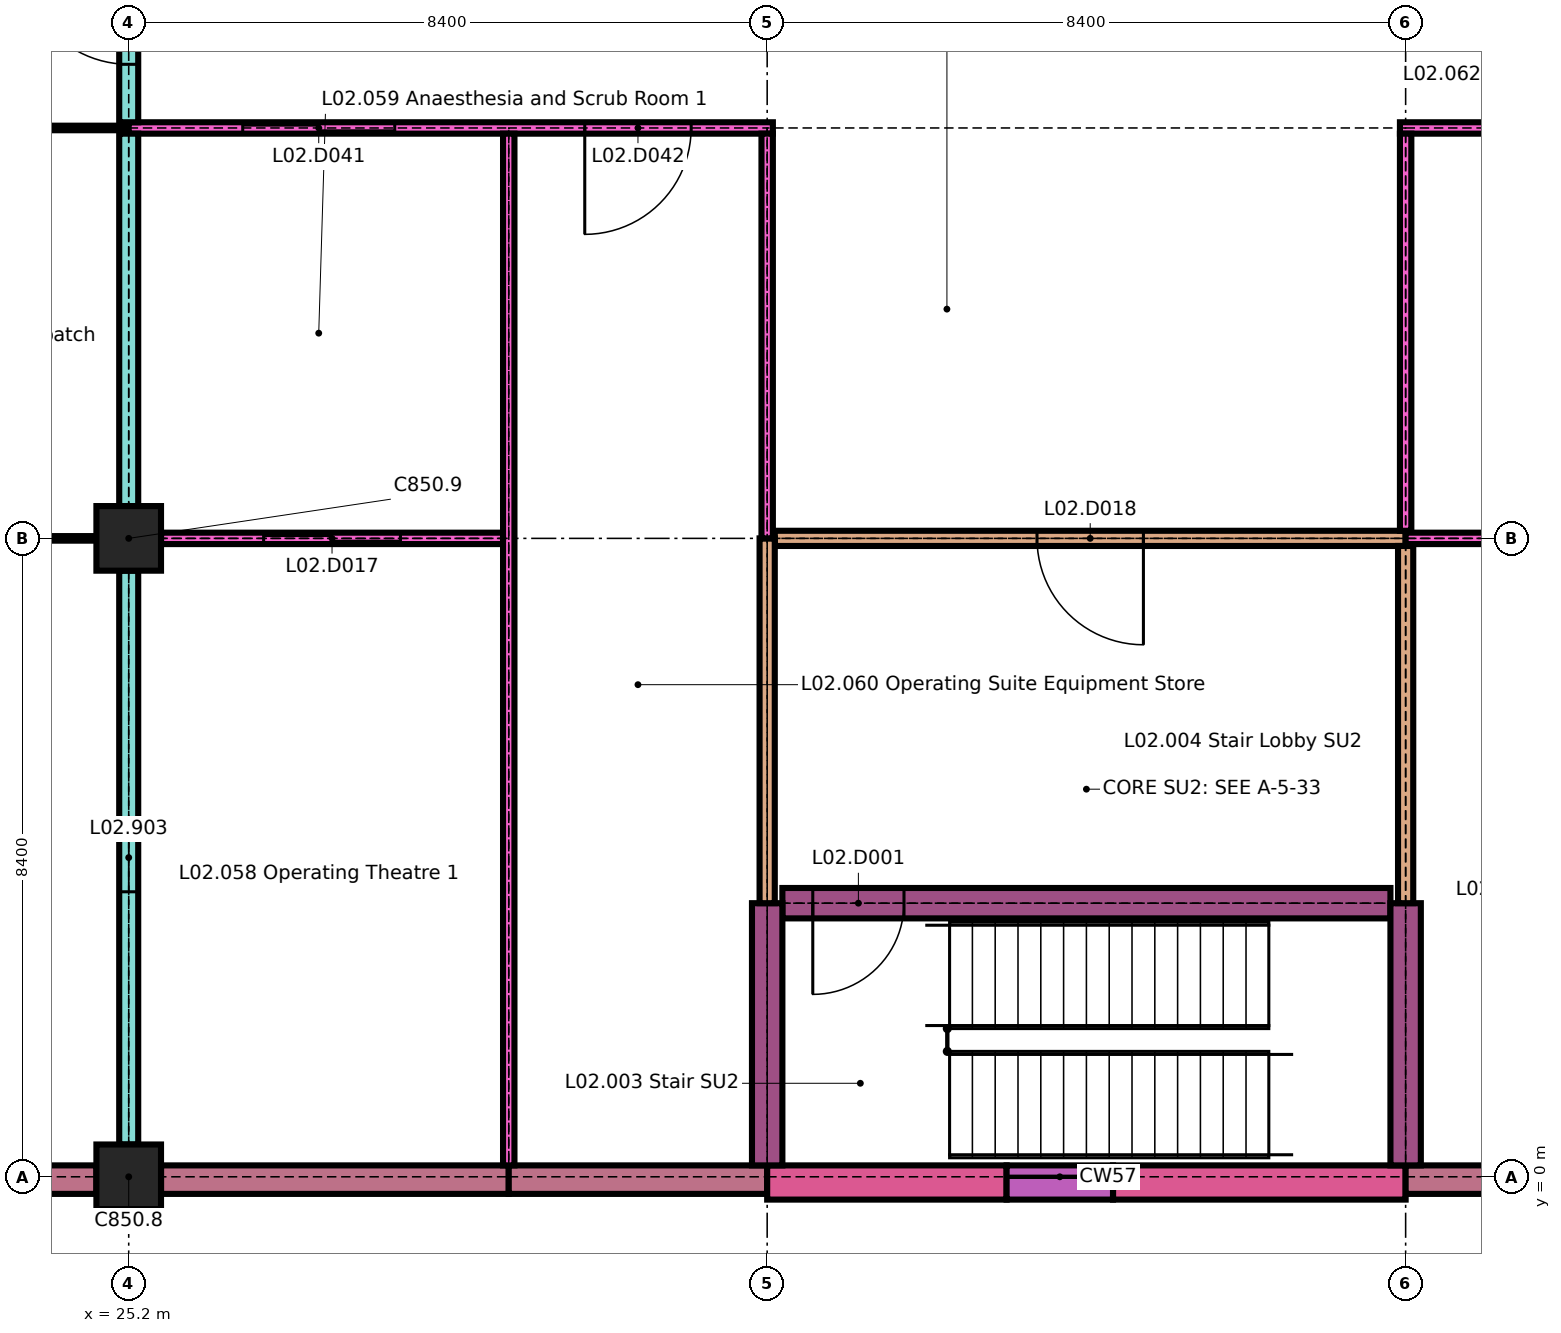
"""IFC4 building model, lengths in metres.
Left out: names, types, materials, properties, quantities, classifications, styles, units other than length and angle.
Written with IfcOpenShell. Run it as: python <this file> out.ifc"""

import sys

from ifc_helpers import new_model, si_unit, direction, frame, frame_2d, origin, origin_2d, place, context, subcontext, project, spatial, rectangle, extrude, element, fill, save


model = new_model("IFC4")
c1 = context("Model", 3, precision=1e-05, world=origin(), true_north=direction((0.0, 1.0)))
c2 = subcontext(c1, "Body", "Model", "MODEL_VIEW")
j1 = project(units=[si_unit("LENGTHUNIT", "METRE"), si_unit("PLANEANGLEUNIT", "RADIAN")], contexts=[c1])
p1 = place(None, origin())
s1 = spatial("IfcSite", under=j1, at=p1, CompositionType="ELEMENT")
p2 = place(p1, origin())
s2 = spatial("IfcBuilding", under=s1, at=p2, CompositionType="ELEMENT")
p3 = place(p2, frame((0.0, 0.0, 8.4)))
s3 = spatial("IfcBuildingStorey", under=s2, at=p3, CompositionType="ELEMENT", Elevation=8.4)
for number, where, z_axis, x_axis in (
    (1, (25.2, 0.0, 0.0), (0.0, 0.0, 1.0), (1.0, 0.0, 0.0)),
    (2, (25.2, 8.4, 0.0), (0.0, 0.0, 1.0), (1.0, 0.0, 0.0)),
):
    element("IfcColumn", number, at=place(p3, frame(where, z_axis=z_axis, x_axis=x_axis)), inside=s3, PredefinedType="COLUMN", context=c2, shape_type="SweptSolid", body=[
        extrude(rectangle(XDim=0.85, YDim=0.85, at=origin_2d()), origin(), (0.0, 0.0, 1.0), 4.2),
    ])
p4 = place(p3, frame((17.225, -0.038, 0.0), z_axis=(0.0, 0.0, 1.0), x_axis=(1.0, 0.0, 0.0)))
e3 = element("IfcWall", 3, at=p4, inside=s3, PredefinedType="SOLIDWALL", context=c2, shape_type="SweptSolid", body=[
    extrude(rectangle(XDim=7.55, YDim=0.375, at=frame_2d((3.775, 0.0))), origin(), (0.0, 0.0, 1.0), 3.9),
])
p5 = place(p3, frame((25.625, -0.038, 0.0), z_axis=(0.0, 0.0, 1.0), x_axis=(1.0, 0.0, 0.0)))
e4 = element("IfcWall", 4, at=p5, inside=s3, PredefinedType="SOLIDWALL", context=c2, shape_type="SweptSolid", body=[
    extrude(rectangle(XDim=4.575, YDim=0.375, at=frame_2d((2.288, 0.0))), origin(), (0.0, 0.0, 1.0), 3.9),
])
p6 = place(p3, frame((30.2, -0.038, 0.0), z_axis=(0.0, 0.0, 1.0), x_axis=(1.0, 0.0, 0.0)))
e5 = element("IfcWall", 5, at=p6, inside=s3, PredefinedType="SOLIDWALL", context=c2, shape_type="SweptSolid", body=[
    extrude(rectangle(XDim=3.4, YDim=0.375, at=frame_2d((1.7, 0.0))), origin(), (0.0, 0.0, 1.0), 3.9),
])
p7 = place(p3, frame((33.6, -0.075, 0.0), z_axis=(0.0, 0.0, 1.0), x_axis=(1.0, 0.0, 0.0)))
e6 = element("IfcWall", 6, at=p7, inside=s3, PredefinedType="SOLIDWALL", context=c2, shape_type="SweptSolid", body=[
    extrude(rectangle(XDim=3.15, YDim=0.45, at=frame_2d((1.575, 0.0))), origin(), (0.0, 0.0, 1.0), 4.2),
])
p8 = place(p3, frame((38.15, -0.075, 0.0), z_axis=(0.0, 0.0, 1.0), x_axis=(1.0, 0.0, 0.0)))
e7 = element("IfcWall", 7, at=p8, inside=s3, PredefinedType="SOLIDWALL", context=c2, shape_type="SweptSolid", body=[
    extrude(rectangle(XDim=3.85, YDim=0.45, at=frame_2d((1.925, 0.0))), origin(), (0.0, 0.0, 1.0), 4.2),
])
p9 = place(p3, frame((36.75, -0.075, 0.0), z_axis=(0.0, 0.0, 1.0), x_axis=(1.0, 0.0, 0.0)))
e8 = element("IfcWall", 8, at=p9, inside=s3, PredefinedType="SOLIDWALL", context=c2, shape_type="SweptSolid", body=[
    extrude(rectangle(XDim=1.4, YDim=0.45, at=frame_2d((0.7, 0.0))), origin(), (0.0, 0.0, 1.0), 0.6),
])
p10 = place(p3, frame((42.0, -0.038, 0.0), z_axis=(0.0, 0.0, 1.0), x_axis=(1.0, 0.0, 0.0)))
e9 = element("IfcWall", 9, at=p10, inside=s3, PredefinedType="SOLIDWALL", context=c2, shape_type="SweptSolid", body=[
    extrude(rectangle(XDim=5.0, YDim=0.375, at=frame_2d((2.5, 0.0))), origin(), (0.0, 0.0, 1.0), 3.9),
])
p11 = place(p10, frame((1.05, 0.0, 0.9)))
e10 = element("IfcOpeningElement", 10, at=p11, cuts=e9, PredefinedType="OPENING", context=c2, shape_type="SweptSolid", body=[
    extrude(rectangle(XDim=2.1, YDim=2.4, at=frame_2d((1.05, 1.2))), frame((0.0, 0.198, 0.0), z_axis=(0.0, -1.0, 0.0), x_axis=(1.0, 0.0, 0.0)), (0.0, 0.0, 1.0), 0.395),
])
p12 = place(p3, frame((33.8, 3.6, 0.0), z_axis=(0.0, 0.0, 1.0), x_axis=(1.0, 0.0, 0.0)))
e11 = element("IfcWall", 11, at=p12, inside=s3, PredefinedType="SHEAR", context=c2, shape_type="SweptSolid", body=[
    extrude(rectangle(XDim=8.0, YDim=0.4, at=frame_2d((4.0, 0.0))), origin(), (0.0, 0.0, 1.0), 4.2),
])
p13 = place(p12, frame((0.4, 0.0, 0.0)))
e12 = element("IfcOpeningElement", 12, at=p13, cuts=e11, PredefinedType="OPENING", context=c2, shape_type="SweptSolid", body=[
    extrude(rectangle(XDim=1.2, YDim=2.1, at=frame_2d((0.6, 1.05))), frame((0.0, 0.21, 0.0), z_axis=(0.0, -1.0, 0.0), x_axis=(1.0, 0.0, 0.0)), (0.0, 0.0, 1.0), 0.42),
])
p14 = place(p3, frame((17.225, 8.4, 0.0), z_axis=(0.0, 0.0, 1.0), x_axis=(1.0, 0.0, 0.0)))
e13 = element("IfcWall", 13, at=p14, inside=s3, PredefinedType="PARTITIONING", context=c2, shape_type="SweptSolid", body=[
    extrude(rectangle(XDim=7.55, YDim=0.06, at=frame_2d((3.775, 0.0))), origin(), (0.0, 0.0, 1.0), 4.2),
])
p15 = place(p14, frame((3.075, 0.0, 0.0)))
e14 = element("IfcOpeningElement", 14, at=p15, cuts=e13, PredefinedType="OPENING", context=c2, shape_type="SweptSolid", body=[
    extrude(rectangle(XDim=1.4, YDim=2.1, at=frame_2d((0.7, 1.05))), frame((0.0, 0.04, 0.0), z_axis=(0.0, -1.0, 0.0), x_axis=(1.0, 0.0, 0.0)), (0.0, 0.0, 1.0), 0.08),
])
p16 = place(p3, frame((25.625, 8.4, 0.0), z_axis=(0.0, 0.0, 1.0), x_axis=(1.0, 0.0, 0.0)))
e15 = element("IfcWall", 15, at=p16, inside=s3, PredefinedType="PARTITIONING", context=c2, shape_type="SweptSolid", body=[
    extrude(rectangle(XDim=4.5, YDim=0.15, at=frame_2d((2.25, 0.0))), origin(), (0.0, 0.0, 1.0), 4.2),
])
p17 = place(p16, frame((1.35, 0.0, 0.0)))
e16 = element("IfcOpeningElement", 16, at=p17, cuts=e15, PredefinedType="OPENING", context=c2, shape_type="SweptSolid", body=[
    extrude(rectangle(XDim=1.8, YDim=2.4, at=frame_2d((0.9, 1.2))), frame((0.0, 0.085, 0.0), z_axis=(0.0, -1.0, 0.0), x_axis=(1.0, 0.0, 0.0)), (0.0, 0.0, 1.0), 0.17),
])
p18 = place(p3, frame((33.7, 8.4, 0.0), z_axis=(0.0, 0.0, 1.0), x_axis=(1.0, 0.0, 0.0)))
e17 = element("IfcWall", 17, at=p18, inside=s3, PredefinedType="PARTITIONING", context=c2, shape_type="SweptSolid", body=[
    extrude(rectangle(XDim=8.3, YDim=0.2, at=frame_2d((4.15, 0.0))), origin(), (0.0, 0.0, 1.0), 4.2),
])
p19 = place(p18, frame((3.45, 0.0, 0.0)))
e18 = element("IfcOpeningElement", 18, at=p19, cuts=e17, PredefinedType="OPENING", context=c2, shape_type="SweptSolid", body=[
    extrude(rectangle(XDim=1.4, YDim=2.1, at=frame_2d((0.7, 1.05))), frame((0.0, 0.11, 0.0), z_axis=(0.0, -1.0, 0.0), x_axis=(1.0, 0.0, 0.0)), (0.0, 0.0, 1.0), 0.22),
])
p20 = place(p3, frame((42.0, 8.4, 0.0), z_axis=(0.0, 0.0, 1.0), x_axis=(1.0, 0.0, 0.0)))
e19 = element("IfcWall", 19, at=p20, inside=s3, PredefinedType="PARTITIONING", context=c2, shape_type="SweptSolid", body=[
    extrude(rectangle(XDim=7.95, YDim=0.15, at=frame_2d((3.975, 0.0))), origin(), (0.0, 0.0, 1.0), 4.2),
])
p21 = place(p20, frame((1.6, 0.0, 0.0)))
e20 = element("IfcOpeningElement", 20, at=p21, cuts=e19, PredefinedType="OPENING", context=c2, shape_type="SweptSolid", body=[
    extrude(rectangle(XDim=1.8, YDim=2.4, at=frame_2d((0.9, 1.2))), frame((0.0, 0.085, 0.0), z_axis=(0.0, -1.0, 0.0), x_axis=(1.0, 0.0, 0.0)), (0.0, 0.0, 1.0), 0.17),
])
p22 = place(p20, frame((5.575, 0.0, 0.0)))
e21 = element("IfcOpeningElement", 21, at=p22, cuts=e19, PredefinedType="OPENING", context=c2, shape_type="SweptSolid", body=[
    extrude(rectangle(XDim=1.8, YDim=2.4, at=frame_2d((0.9, 1.2))), frame((0.0, 0.085, 0.0), z_axis=(0.0, -1.0, 0.0), x_axis=(1.0, 0.0, 0.0)), (0.0, 0.0, 1.0), 0.17),
])
p23 = place(p3, frame((0.15, 13.8, 0.0), z_axis=(0.0, 0.0, 1.0), x_axis=(1.0, 0.0, 0.0)))
e22 = element("IfcWall", 22, at=p23, inside=s3, PredefinedType="PARTITIONING", context=c2, shape_type="SweptSolid", body=[
    extrude(rectangle(XDim=25.05, YDim=0.06, at=frame_2d((12.525, 0.0))), origin(), (0.0, 0.0, 1.0), 4.2),
])
p24 = place(p23, frame((3.425, 0.0, 0.0)))
e23 = element("IfcOpeningElement", 23, at=p24, cuts=e22, PredefinedType="OPENING", context=c2, shape_type="SweptSolid", body=[
    extrude(rectangle(XDim=1.4, YDim=2.1, at=frame_2d((0.7, 1.05))), frame((0.0, 0.04, 0.0), z_axis=(0.0, -1.0, 0.0), x_axis=(1.0, 0.0, 0.0)), (0.0, 0.0, 1.0), 0.08),
])
p25 = place(p23, frame((20.15, 0.0, 0.0)))
e24 = element("IfcOpeningElement", 24, at=p25, cuts=e22, PredefinedType="OPENING", context=c2, shape_type="SweptSolid", body=[
    extrude(rectangle(XDim=1.4, YDim=2.1, at=frame_2d((0.7, 1.05))), frame((0.0, 0.04, 0.0), z_axis=(0.0, -1.0, 0.0), x_axis=(1.0, 0.0, 0.0)), (0.0, 0.0, 1.0), 0.08),
])
p26 = place(p23, frame((18.65, 0.0, 0.9)))
e25 = element("IfcOpeningElement", 25, at=p26, cuts=e22, PredefinedType="OPENING", context=c2, shape_type="SweptSolid", body=[
    extrude(rectangle(XDim=1.2, YDim=0.9, at=frame_2d((0.6, 0.45))), frame((0.0, 0.04, 0.0), z_axis=(0.0, -1.0, 0.0), x_axis=(1.0, 0.0, 0.0)), (0.0, 0.0, 1.0), 0.08),
])
p27 = place(p3, frame((25.2, 13.8, 0.0), z_axis=(0.0, 0.0, 1.0), x_axis=(1.0, 0.0, 0.0)))
e26 = element("IfcWall", 26, at=p27, inside=s3, PredefinedType="PARTITIONING", context=c2, shape_type="SweptSolid", body=[
    extrude(rectangle(XDim=8.475, YDim=0.15, at=frame_2d((4.238, 0.0))), origin(), (0.0, 0.0, 1.0), 4.2),
])
p28 = place(p27, frame((1.5, 0.0, 0.0)))
e27 = element("IfcOpeningElement", 27, at=p28, cuts=e26, PredefinedType="OPENING", context=c2, shape_type="SweptSolid", body=[
    extrude(rectangle(XDim=2.0, YDim=2.4, at=frame_2d((1.0, 1.2))), frame((0.0, 0.085, 0.0), z_axis=(0.0, -1.0, 0.0), x_axis=(1.0, 0.0, 0.0)), (0.0, 0.0, 1.0), 0.17),
])
p29 = place(p27, frame((6.0, 0.0, 0.0)))
e28 = element("IfcOpeningElement", 28, at=p29, cuts=e26, PredefinedType="OPENING", context=c2, shape_type="SweptSolid", body=[
    extrude(rectangle(XDim=1.4, YDim=2.1, at=frame_2d((0.7, 1.05))), frame((0.0, 0.085, 0.0), z_axis=(0.0, -1.0, 0.0), x_axis=(1.0, 0.0, 0.0)), (0.0, 0.0, 1.0), 0.17),
])
p30 = place(p3, frame((41.925, 13.8, 0.0), z_axis=(0.0, 0.0, 1.0), x_axis=(1.0, 0.0, 0.0)))
e29 = element("IfcWall", 29, at=p30, inside=s3, PredefinedType="PARTITIONING", context=c2, shape_type="SweptSolid", body=[
    extrude(rectangle(XDim=25.35, YDim=0.15, at=frame_2d((12.675, 0.0))), origin(), (0.0, 0.0, 1.0), 4.2),
])
p31 = place(p30, frame((1.575, 0.0, 0.0)))
e30 = element("IfcOpeningElement", 30, at=p31, cuts=e29, PredefinedType="OPENING", context=c2, shape_type="SweptSolid", body=[
    extrude(rectangle(XDim=2.0, YDim=2.4, at=frame_2d((1.0, 1.2))), frame((0.0, 0.085, 0.0), z_axis=(0.0, -1.0, 0.0), x_axis=(1.0, 0.0, 0.0)), (0.0, 0.0, 1.0), 0.17),
])
p32 = place(p30, frame((6.575, 0.0, 0.0)))
e31 = element("IfcOpeningElement", 31, at=p32, cuts=e29, PredefinedType="OPENING", context=c2, shape_type="SweptSolid", body=[
    extrude(rectangle(XDim=2.0, YDim=2.4, at=frame_2d((1.0, 1.2))), frame((0.0, 0.085, 0.0), z_axis=(0.0, -1.0, 0.0), x_axis=(1.0, 0.0, 0.0)), (0.0, 0.0, 1.0), 0.17),
])
p33 = place(p30, frame((11.575, 0.0, 0.0)))
e32 = element("IfcOpeningElement", 32, at=p33, cuts=e29, PredefinedType="OPENING", context=c2, shape_type="SweptSolid", body=[
    extrude(rectangle(XDim=2.0, YDim=2.4, at=frame_2d((1.0, 1.2))), frame((0.0, 0.085, 0.0), z_axis=(0.0, -1.0, 0.0), x_axis=(1.0, 0.0, 0.0)), (0.0, 0.0, 1.0), 0.17),
])
p34 = place(p30, frame((16.575, 0.0, 0.0)))
e33 = element("IfcOpeningElement", 33, at=p34, cuts=e29, PredefinedType="OPENING", context=c2, shape_type="SweptSolid", body=[
    extrude(rectangle(XDim=2.0, YDim=2.4, at=frame_2d((1.0, 1.2))), frame((0.0, 0.085, 0.0), z_axis=(0.0, -1.0, 0.0), x_axis=(1.0, 0.0, 0.0)), (0.0, 0.0, 1.0), 0.17),
])
p35 = place(p30, frame((21.675, 0.0, 0.0)))
e34 = element("IfcOpeningElement", 34, at=p35, cuts=e29, PredefinedType="OPENING", context=c2, shape_type="SweptSolid", body=[
    extrude(rectangle(XDim=2.0, YDim=2.4, at=frame_2d((1.0, 1.2))), frame((0.0, 0.085, 0.0), z_axis=(0.0, -1.0, 0.0), x_axis=(1.0, 0.0, 0.0)), (0.0, 0.0, 1.0), 0.17),
])
p36 = place(p3, frame((25.2, 0.425, 0.0), z_axis=(0.0, 0.0, 1.0), x_axis=(0.0, 1.0, 0.0)))
e35 = element("IfcWall", 35, at=p36, inside=s3, PredefinedType="SOLIDWALL", context=c2, shape_type="SweptSolid", body=[
    extrude(rectangle(XDim=7.55, YDim=0.25, at=frame_2d((3.775, 0.0))), origin(), (0.0, 0.0, 1.0), 4.2),
])
p37 = place(p36, frame((3.325, 0.0, 0.9)))
e36 = element("IfcOpeningElement", 36, at=p37, cuts=e35, PredefinedType="OPENING", context=c2, shape_type="SweptSolid", body=[
    extrude(rectangle(XDim=0.9, YDim=0.6, at=frame_2d((0.45, 0.3))), frame((0.0, 0.135, 0.0), z_axis=(0.0, -1.0, 0.0), x_axis=(1.0, 0.0, 0.0)), (0.0, 0.0, 1.0), 0.27),
])
p38 = place(p3, frame((25.2, 8.825, 0.0), z_axis=(0.0, 0.0, 1.0), x_axis=(0.0, 1.0, 0.0)))
e37 = element("IfcWall", 37, at=p38, inside=s3, PredefinedType="SOLIDWALL", context=c2, shape_type="SweptSolid", body=[
    extrude(rectangle(XDim=4.9, YDim=0.25, at=frame_2d((2.45, 0.0))), origin(), (0.0, 0.0, 1.0), 4.2),
])
p39 = place(p3, frame((25.2, 13.875, 0.0), z_axis=(0.0, 0.0, 1.0), x_axis=(0.0, 1.0, 0.0)))
e38 = element("IfcWall", 38, at=p39, inside=s3, PredefinedType="SOLIDWALL", context=c2, shape_type="SweptSolid", body=[
    extrude(rectangle(XDim=7.725, YDim=0.25, at=frame_2d((3.863, 0.0))), origin(), (0.0, 0.0, 1.0), 4.2),
])
p40 = place(p39, frame((0.762, 0.0, 0.0)))
e39 = element("IfcOpeningElement", 39, at=p40, cuts=e38, PredefinedType="OPENING", context=c2, shape_type="SweptSolid", body=[
    extrude(rectangle(XDim=1.4, YDim=2.1, at=frame_2d((0.7, 1.05))), frame((0.0, 0.135, 0.0), z_axis=(0.0, -1.0, 0.0), x_axis=(1.0, 0.0, 0.0)), (0.0, 0.0, 1.0), 0.27),
])
p41 = place(p3, frame((30.2, 0.15, 0.0), z_axis=(0.0, 0.0, 1.0), x_axis=(0.0, 1.0, 0.0)))
e40 = element("IfcWall", 40, at=p41, inside=s3, PredefinedType="PARTITIONING", context=c2, shape_type="SweptSolid", body=[
    extrude(rectangle(XDim=13.575, YDim=0.15, at=frame_2d((6.788, 0.0))), origin(), (0.0, 0.0, 1.0), 4.2),
])
p42 = place(p3, frame((33.6, 0.15, 0.0), z_axis=(0.0, 0.0, 1.0), x_axis=(0.0, 1.0, 0.0)))
e41 = element("IfcWall", 41, at=p42, inside=s3, PredefinedType="SHEAR", context=c2, shape_type="SweptSolid", body=[
    extrude(rectangle(XDim=3.45, YDim=0.4, at=frame_2d((1.725, 0.0))), origin(), (0.0, 0.0, 1.0), 4.2),
])
p43 = place(p3, frame((33.6, 3.6, 0.0), z_axis=(0.0, 0.0, 1.0), x_axis=(0.0, 1.0, 0.0)))
e42 = element("IfcWall", 42, at=p43, inside=s3, PredefinedType="PARTITIONING", context=c2, shape_type="SweptSolid", body=[
    extrude(rectangle(XDim=4.8, YDim=0.2, at=frame_2d((2.4, 0.0))), origin(), (0.0, 0.0, 1.0), 4.2),
])
p44 = place(p3, frame((33.6, 8.4, 0.0), z_axis=(0.0, 0.0, 1.0), x_axis=(0.0, 1.0, 0.0)))
e43 = element("IfcWall", 43, at=p44, inside=s3, PredefinedType="PARTITIONING", context=c2, shape_type="SweptSolid", body=[
    extrude(rectangle(XDim=5.325, YDim=0.15, at=frame_2d((2.663, 0.0))), origin(), (0.0, 0.0, 1.0), 4.2),
])
p45 = place(p3, frame((42.0, 0.15, 0.0), z_axis=(0.0, 0.0, 1.0), x_axis=(0.0, 1.0, 0.0)))
e44 = element("IfcWall", 44, at=p45, inside=s3, PredefinedType="SHEAR", context=c2, shape_type="SweptSolid", body=[
    extrude(rectangle(XDim=3.45, YDim=0.4, at=frame_2d((1.725, 0.0))), origin(), (0.0, 0.0, 1.0), 4.2),
])
p46 = place(p3, frame((42.0, 3.6, 0.0), z_axis=(0.0, 0.0, 1.0), x_axis=(0.0, 1.0, 0.0)))
e45 = element("IfcWall", 45, at=p46, inside=s3, PredefinedType="PARTITIONING", context=c2, shape_type="SweptSolid", body=[
    extrude(rectangle(XDim=4.7, YDim=0.2, at=frame_2d((2.35, 0.0))), origin(), (0.0, 0.0, 1.0), 4.2),
])
p47 = place(p3, frame((42.0, 8.5, 0.0), z_axis=(0.0, 0.0, 1.0), x_axis=(0.0, 1.0, 0.0)))
e46 = element("IfcWall", 46, at=p47, inside=s3, PredefinedType="PARTITIONING", context=c2, shape_type="SweptSolid", body=[
    extrude(rectangle(XDim=5.225, YDim=0.15, at=frame_2d((2.613, 0.0))), origin(), (0.0, 0.0, 1.0), 4.2),
])
p48 = place(p13, origin())
e47 = element("IfcDoor", 47, at=p48, inside=s3, OperationType="SINGLE_SWING_LEFT", PredefinedType="DOOR", context=c2, shape_type="SweptSolid", body=[
    extrude(rectangle(XDim=1.2, YDim=2.1, at=frame_2d((0.6, 1.05))), frame((0.0, 0.025, 0.0), z_axis=(0.0, -1.0, 0.0), x_axis=(1.0, 0.0, 0.0)), (0.0, 0.0, 1.0), 0.05),
])
fill(e12, e47)
p49 = place(p17, origin())
e48 = element("IfcDoor", 48, at=p49, inside=s3, OperationType="DOUBLE_DOOR_SLIDING", PredefinedType="DOOR", context=c2, shape_type="SweptSolid", body=[
    extrude(rectangle(XDim=1.8, YDim=2.4, at=frame_2d((0.9, 1.2))), frame((0.0, 0.045, 0.0), z_axis=(0.0, -1.0, 0.0), x_axis=(1.0, 0.0, 0.0)), (0.0, 0.0, 1.0), 0.09),
])
fill(e16, e48)
p50 = place(p19, origin())
e49 = element("IfcDoor", 49, at=p50, inside=s3, OperationType="SINGLE_SWING_RIGHT", PredefinedType="DOOR", context=c2, shape_type="SweptSolid", body=[
    extrude(rectangle(XDim=1.4, YDim=2.1, at=frame_2d((0.7, 1.05))), frame((0.0, 0.025, 0.0), z_axis=(0.0, -1.0, 0.0), x_axis=(1.0, 0.0, 0.0)), (0.0, 0.0, 1.0), 0.05),
])
fill(e18, e49)
p51 = place(p28, origin())
e50 = element("IfcDoor", 50, at=p51, inside=s3, OperationType="DOUBLE_DOOR_SLIDING", PredefinedType="DOOR", context=c2, shape_type="SweptSolid", body=[
    extrude(rectangle(XDim=2.0, YDim=2.4, at=frame_2d((1.0, 1.2))), frame((0.0, 0.045, 0.0), z_axis=(0.0, -1.0, 0.0), x_axis=(1.0, 0.0, 0.0)), (0.0, 0.0, 1.0), 0.09),
])
fill(e27, e50)
p52 = place(p29, origin())
e51 = element("IfcDoor", 51, at=p52, inside=s3, OperationType="SINGLE_SWING_LEFT", PredefinedType="DOOR", context=c2, shape_type="SweptSolid", body=[
    extrude(rectangle(XDim=1.4, YDim=2.1, at=frame_2d((0.7, 1.05))), frame((0.0, 0.025, 0.0), z_axis=(0.0, -1.0, 0.0), x_axis=(1.0, 0.0, 0.0)), (0.0, 0.0, 1.0), 0.05),
])
fill(e28, e51)
p53 = place(p40, origin())
e52 = element("IfcDoor", 52, at=p53, inside=s3, OperationType="SINGLE_SWING_LEFT", PredefinedType="DOOR", context=c2, shape_type="SweptSolid", body=[
    extrude(rectangle(XDim=1.4, YDim=2.1, at=frame_2d((0.7, 1.05))), frame((0.0, 0.03, 0.0), z_axis=(0.0, -1.0, 0.0), x_axis=(1.0, 0.0, 0.0)), (0.0, 0.0, 1.0), 0.06),
])
fill(e39, e52)
p54 = place(p37, origin())
e53 = element("IfcWindow", 53, at=p54, inside=s3, PartitioningType="DOUBLE_PANEL_HORIZONTAL", PredefinedType="WINDOW", context=c2, shape_type="SweptSolid", body=[
    extrude(rectangle(XDim=0.9, YDim=0.6, at=frame_2d((0.45, 0.3))), frame((0.0, 0.03, 0.0), z_axis=(0.0, -1.0, 0.0), x_axis=(1.0, 0.0, 0.0)), (0.0, 0.0, 1.0), 0.06),
])
fill(e36, e53)
save(model, sys.argv[1])
